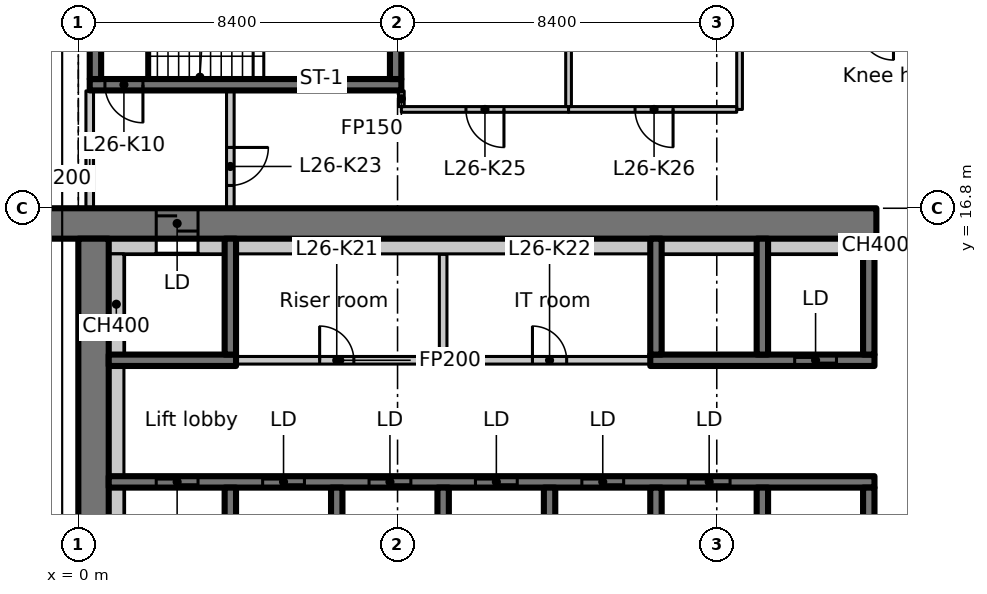
"""IFC4 building model, lengths in metres.
Left out: names, types, materials, properties, quantities, classifications, styles, units other than length and angle.
Written with IfcOpenShell. Run it as: python <this file> out.ifc"""

import sys

from ifc_helpers import new_model, si_unit, direction, frame, frame_2d, origin, place, context, subcontext, project, spatial, rectangle, extrude, element, fill, save


model = new_model("IFC4")
c1 = context("Model", 3, precision=1e-05, world=origin(), true_north=direction((0.0, 1.0)))
c2 = subcontext(c1, "Body", "Model", "MODEL_VIEW")
j1 = project(units=[si_unit("LENGTHUNIT", "METRE"), si_unit("PLANEANGLEUNIT", "RADIAN")], contexts=[c1])
p1 = place(None, origin())
s1 = spatial("IfcSite", under=j1, at=p1, CompositionType="ELEMENT")
p2 = place(p1, origin())
s2 = spatial("IfcBuilding", under=s1, at=p2, CompositionType="ELEMENT")
p3 = place(p2, frame((0.0, 0.0, 109.7)))
s3 = spatial("IfcBuildingStorey", under=s2, at=p3, CompositionType="ELEMENT", Elevation=109.7)
p4 = place(p3, frame((-1.1, 16.4, 0.0), z_axis=(0.0, 0.0, 1.0), x_axis=(1.0, 0.0, 0.0)))
e1 = element("IfcWall", 1, at=p4, inside=s3, PredefinedType="SHEAR", context=c2, shape_type="SweptSolid", body=[
    extrude(rectangle(XDim=22.1, YDim=0.8, at=frame_2d((11.05, 0.0))), origin(), (0.0, 0.0, 1.0), 3.35),
])
p5 = place(p4, frame((3.15, 0.0, 0.0)))
e2 = element("IfcOpeningElement", 2, at=p5, cuts=e1, PredefinedType="OPENING", context=c2, shape_type="SweptSolid", body=[
    extrude(rectangle(XDim=1.1, YDim=2.3, at=frame_2d((0.55, 1.15))), frame((0.0, 0.41, 0.0), z_axis=(0.0, -1.0, 0.0), x_axis=(1.0, 0.0, 0.0)), (0.0, 0.0, 1.0), 0.82),
])
p6 = place(p3, frame((0.4, 7.136, 0.0), z_axis=(0.0, 0.0, 1.0), x_axis=(0.0, 1.0, 0.0)))
e3 = element("IfcWall", 3, at=p6, inside=s3, PredefinedType="SHEAR", context=c2, shape_type="SweptSolid", body=[
    extrude(rectangle(XDim=8.864, YDim=0.8, at=frame_2d((4.432, 0.0))), origin(), (0.0, 0.0, 1.0), 3.35),
])
p7 = place(p3, frame((0.8, 15.8, 0.0), z_axis=(0.0, 0.0, 1.0), x_axis=(1.0, 0.0, 0.0)))
e4 = element("IfcWall", 4, at=p7, inside=s3, PredefinedType="PARTITIONING", context=c2, shape_type="SweptSolid", body=[
    extrude(rectangle(XDim=1.25, YDim=0.4, at=frame_2d((0.625, 0.0))), origin(), (0.0, 0.0, 1.0), 3.35),
])
p8 = place(p3, frame((0.8, 9.6, 0.0), z_axis=(0.0, 0.0, 1.0), x_axis=(1.0, 0.0, 0.0)))
e5 = element("IfcWall", 5, at=p8, inside=s3, PredefinedType="SHEAR", context=c2, shape_type="SweptSolid", body=[
    extrude(rectangle(XDim=20.15, YDim=0.3, at=frame_2d((10.075, 0.0))), origin(), (0.0, 0.0, 1.0), 3.35),
])
p9 = place(p8, frame((1.25, 0.0, 0.0)))
e6 = element("IfcOpeningElement", 6, at=p9, cuts=e5, PredefinedType="OPENING", context=c2, shape_type="SweptSolid", body=[
    extrude(rectangle(XDim=1.1, YDim=2.3, at=frame_2d((0.55, 1.15))), frame((0.0, 0.16, 0.0), z_axis=(0.0, -1.0, 0.0), x_axis=(1.0, 0.0, 0.0)), (0.0, 0.0, 1.0), 0.32),
])
p10 = place(p8, frame((4.05, 0.0, 0.0)))
e7 = element("IfcOpeningElement", 7, at=p10, cuts=e5, PredefinedType="OPENING", context=c2, shape_type="SweptSolid", body=[
    extrude(rectangle(XDim=1.1, YDim=2.3, at=frame_2d((0.55, 1.15))), frame((0.0, 0.16, 0.0), z_axis=(0.0, -1.0, 0.0), x_axis=(1.0, 0.0, 0.0)), (0.0, 0.0, 1.0), 0.32),
])
p11 = place(p8, frame((6.85, 0.0, 0.0)))
e8 = element("IfcOpeningElement", 8, at=p11, cuts=e5, PredefinedType="OPENING", context=c2, shape_type="SweptSolid", body=[
    extrude(rectangle(XDim=1.1, YDim=2.3, at=frame_2d((0.55, 1.15))), frame((0.0, 0.16, 0.0), z_axis=(0.0, -1.0, 0.0), x_axis=(1.0, 0.0, 0.0)), (0.0, 0.0, 1.0), 0.32),
])
p12 = place(p8, frame((9.65, 0.0, 0.0)))
e9 = element("IfcOpeningElement", 9, at=p12, cuts=e5, PredefinedType="OPENING", context=c2, shape_type="SweptSolid", body=[
    extrude(rectangle(XDim=1.1, YDim=2.3, at=frame_2d((0.55, 1.15))), frame((0.0, 0.16, 0.0), z_axis=(0.0, -1.0, 0.0), x_axis=(1.0, 0.0, 0.0)), (0.0, 0.0, 1.0), 0.32),
])
p13 = place(p8, frame((12.45, 0.0, 0.0)))
e10 = element("IfcOpeningElement", 10, at=p13, cuts=e5, PredefinedType="OPENING", context=c2, shape_type="SweptSolid", body=[
    extrude(rectangle(XDim=1.1, YDim=2.3, at=frame_2d((0.55, 1.15))), frame((0.0, 0.16, 0.0), z_axis=(0.0, -1.0, 0.0), x_axis=(1.0, 0.0, 0.0)), (0.0, 0.0, 1.0), 0.32),
])
p14 = place(p8, frame((15.25, 0.0, 0.0)))
e11 = element("IfcOpeningElement", 11, at=p14, cuts=e5, PredefinedType="OPENING", context=c2, shape_type="SweptSolid", body=[
    extrude(rectangle(XDim=1.1, YDim=2.3, at=frame_2d((0.55, 1.15))), frame((0.0, 0.16, 0.0), z_axis=(0.0, -1.0, 0.0), x_axis=(1.0, 0.0, 0.0)), (0.0, 0.0, 1.0), 0.32),
])
for number, where, z_axis, x_axis in (
    (12, (4.0, 7.15, 0.0), (0.0, 0.0, 1.0), (0.0, 1.0, 0.0)),
    (13, (6.8, 7.15, 0.0), (0.0, 0.0, 1.0), (0.0, 1.0, 0.0)),
    (14, (9.6, 7.15, 0.0), (0.0, 0.0, 1.0), (0.0, 1.0, 0.0)),
    (15, (12.4, 7.15, 0.0), (0.0, 0.0, 1.0), (0.0, 1.0, 0.0)),
    (16, (15.2, 7.15, 0.0), (0.0, 0.0, 1.0), (0.0, 1.0, 0.0)),
    (17, (18.0, 7.15, 0.0), (0.0, 0.0, 1.0), (0.0, 1.0, 0.0)),
    (18, (20.8, 7.15, 0.0), (0.0, 0.0, 1.0), (0.0, 1.0, 0.0)),
):
    element("IfcWall", number, at=place(p3, frame(where, z_axis=z_axis, x_axis=x_axis)), inside=s3, PredefinedType="SHEAR", context=c2, shape_type="SweptSolid", body=[
        extrude(rectangle(XDim=2.3, YDim=0.3, at=frame_2d((1.15, 0.0))), origin(), (0.0, 0.0, 1.0), 3.35),
    ])
p15 = place(p3, frame((0.8, 12.8, 0.0), z_axis=(0.0, 0.0, 1.0), x_axis=(1.0, 0.0, 0.0)))
e19 = element("IfcWall", 19, at=p15, inside=s3, PredefinedType="SHEAR", context=c2, shape_type="SweptSolid", body=[
    extrude(rectangle(XDim=3.35, YDim=0.3, at=frame_2d((1.675, 0.0))), origin(), (0.0, 0.0, 1.0), 3.35),
])
p16 = place(p3, frame((4.0, 12.95, 0.0), z_axis=(0.0, 0.0, 1.0), x_axis=(0.0, 1.0, 0.0)))
e20 = element("IfcWall", 20, at=p16, inside=s3, PredefinedType="SHEAR", context=c2, shape_type="SweptSolid", body=[
    extrude(rectangle(XDim=3.05, YDim=0.3, at=frame_2d((1.525, 0.0))), origin(), (0.0, 0.0, 1.0), 3.35),
])
p17 = place(p3, frame((15.05, 12.8, 0.0), z_axis=(0.0, 0.0, 1.0), x_axis=(1.0, 0.0, 0.0)))
e21 = element("IfcWall", 21, at=p17, inside=s3, PredefinedType="SHEAR", context=c2, shape_type="SweptSolid", body=[
    extrude(rectangle(XDim=5.9, YDim=0.3, at=frame_2d((2.95, 0.0))), origin(), (0.0, 0.0, 1.0), 3.35),
])
p18 = place(p17, frame((3.8, 0.0, 0.0)))
e22 = element("IfcOpeningElement", 22, at=p18, cuts=e21, PredefinedType="OPENING", context=c2, shape_type="SweptSolid", body=[
    extrude(rectangle(XDim=1.1, YDim=2.3, at=frame_2d((0.55, 1.15))), frame((0.0, 0.16, 0.0), z_axis=(0.0, -1.0, 0.0), x_axis=(1.0, 0.0, 0.0)), (0.0, 0.0, 1.0), 0.32),
])
for number, where, z_axis, x_axis in (
    (23, (15.2, 12.95, 0.0), (0.0, 0.0, 1.0), (0.0, 1.0, 0.0)),
    (24, (18.0, 12.95, 0.0), (0.0, 0.0, 1.0), (0.0, 1.0, 0.0)),
    (25, (20.8, 12.95, 0.0), (0.0, 0.0, 1.0), (0.0, 1.0, 0.0)),
):
    element("IfcWall", number, at=place(p3, frame(where, z_axis=z_axis, x_axis=x_axis)), inside=s3, PredefinedType="SHEAR", context=c2, shape_type="SweptSolid", body=[
        extrude(rectangle(XDim=3.05, YDim=0.3, at=frame_2d((1.525, 0.0))), origin(), (0.0, 0.0, 1.0), 3.35),
    ])
p19 = place(p3, frame((8.5, 20.05, 0.0), z_axis=(0.0, 0.0, 1.0), x_axis=(-1.0, 0.0, 0.0)))
e26 = element("IfcWall", 26, at=p19, inside=s3, PredefinedType="SHEAR", context=c2, shape_type="SweptSolid", body=[
    extrude(rectangle(XDim=8.2, YDim=0.3, at=frame_2d((4.1, 0.0))), origin(), (0.0, 0.0, 1.0), 3.35),
])
p20 = place(p19, frame((6.8, 0.0, 0.0)))
e27 = element("IfcOpeningElement", 27, at=p20, cuts=e26, PredefinedType="OPENING", context=c2, shape_type="SweptSolid", body=[
    extrude(rectangle(XDim=1.0, YDim=2.1, at=frame_2d((0.5, 1.05))), frame((0.0, 0.16, 0.0), z_axis=(0.0, -1.0, 0.0), x_axis=(1.0, 0.0, 0.0)), (0.0, 0.0, 1.0), 0.32),
])
for number, where, z_axis, x_axis in (
    (28, (0.45, 20.2, 0.0), (0.0, 0.0, 1.0), (0.0, 1.0, 0.0)),
    (29, (8.35, 20.2, 0.0), (0.0, 0.0, 1.0), (0.0, 1.0, 0.0)),
):
    element("IfcWall", number, at=place(p3, frame(where, z_axis=z_axis, x_axis=x_axis)), inside=s3, PredefinedType="SHEAR", context=c2, shape_type="SweptSolid", body=[
        extrude(rectangle(XDim=2.55, YDim=0.3, at=frame_2d((1.275, 0.0))), origin(), (0.0, 0.0, 1.0), 3.35),
    ])
p21 = place(p3, frame((0.3, 16.812, 0.0), z_axis=(0.0, 0.0, 1.0), x_axis=(0.0, 1.0, 0.0)))
e30 = element("IfcWall", 30, at=p21, inside=s3, PredefinedType="PARTITIONING", context=c2, shape_type="SweptSolid", body=[
    extrude(rectangle(XDim=3.076, YDim=0.2, at=frame_2d((1.538, 0.0))), origin(), (0.0, 0.0, 1.0), 2.98),
])
p22 = place(p3, frame((4.0, 19.888, 0.0), z_axis=(0.0, 0.0, 1.0), x_axis=(0.0, -1.0, 0.0)))
e31 = element("IfcWall", 31, at=p22, inside=s3, PredefinedType="PARTITIONING", context=c2, shape_type="SweptSolid", body=[
    extrude(rectangle(XDim=3.076, YDim=0.2, at=frame_2d((1.538, 0.0))), origin(), (0.0, 0.0, 1.0), 3.35),
])
p23 = place(p22, frame((1.488, 0.0, 0.0)))
e32 = element("IfcOpeningElement", 32, at=p23, cuts=e31, PredefinedType="OPENING", context=c2, shape_type="SweptSolid", body=[
    extrude(rectangle(XDim=1.0, YDim=2.1, at=frame_2d((0.5, 1.05))), frame((0.0, 0.11, 0.0), z_axis=(0.0, -1.0, 0.0), x_axis=(1.0, 0.0, 0.0)), (0.0, 0.0, 1.0), 0.22),
])
p24 = place(p3, frame((4.162, 12.8, 0.0), z_axis=(0.0, 0.0, 1.0), x_axis=(1.0, 0.0, 0.0)))
e33 = element("IfcWall", 33, at=p24, inside=s3, PredefinedType="PARTITIONING", context=c2, shape_type="SweptSolid", body=[
    extrude(rectangle(XDim=5.438, YDim=0.2, at=frame_2d((2.719, 0.0))), origin(), (0.0, 0.0, 1.0), 3.35),
])
p25 = place(p24, frame((2.188, 0.0, 0.0)))
e34 = element("IfcOpeningElement", 34, at=p25, cuts=e33, PredefinedType="OPENING", context=c2, shape_type="SweptSolid", body=[
    extrude(rectangle(XDim=0.9, YDim=2.1, at=frame_2d((0.45, 1.05))), frame((0.0, 0.11, 0.0), z_axis=(0.0, -1.0, 0.0), x_axis=(1.0, 0.0, 0.0)), (0.0, 0.0, 1.0), 0.22),
])
p26 = place(p3, frame((9.6, 12.8, 0.0), z_axis=(0.0, 0.0, 1.0), x_axis=(1.0, 0.0, 0.0)))
e35 = element("IfcWall", 35, at=p26, inside=s3, PredefinedType="PARTITIONING", context=c2, shape_type="SweptSolid", body=[
    extrude(rectangle(XDim=5.438, YDim=0.2, at=frame_2d((2.719, 0.0))), origin(), (0.0, 0.0, 1.0), 3.35),
])
p27 = place(p26, frame((2.35, 0.0, 0.0)))
e36 = element("IfcOpeningElement", 36, at=p27, cuts=e35, PredefinedType="OPENING", context=c2, shape_type="SweptSolid", body=[
    extrude(rectangle(XDim=0.9, YDim=2.1, at=frame_2d((0.45, 1.05))), frame((0.0, 0.11, 0.0), z_axis=(0.0, -1.0, 0.0), x_axis=(1.0, 0.0, 0.0)), (0.0, 0.0, 1.0), 0.22),
])
p28 = place(p3, frame((9.6, 15.588, 0.0), z_axis=(0.0, 0.0, 1.0), x_axis=(0.0, -1.0, 0.0)))
e37 = element("IfcWall", 37, at=p28, inside=s3, PredefinedType="PARTITIONING", context=c2, shape_type="SweptSolid", body=[
    extrude(rectangle(XDim=2.688, YDim=0.2, at=frame_2d((1.344, 0.0))), origin(), (0.0, 0.0, 1.0), 3.35),
])
p29 = place(p3, frame((12.9, 19.4, 0.0), z_axis=(0.0, 0.0, 1.0), x_axis=(-1.0, 0.0, 0.0)))
e38 = element("IfcWall", 38, at=p29, inside=s3, PredefinedType="PARTITIONING", context=c2, shape_type="SweptSolid", body=[
    extrude(rectangle(XDim=4.4, YDim=0.15, at=frame_2d((2.2, 0.0))), origin(), (0.0, 0.0, 1.0), 3.35),
])
p30 = place(p29, frame((1.7, 0.0, 0.0)))
e39 = element("IfcOpeningElement", 39, at=p30, cuts=e38, PredefinedType="OPENING", context=c2, shape_type="SweptSolid", body=[
    extrude(rectangle(XDim=1.0, YDim=2.1, at=frame_2d((0.5, 1.05))), frame((0.0, 0.085, 0.0), z_axis=(0.0, -1.0, 0.0), x_axis=(1.0, 0.0, 0.0)), (0.0, 0.0, 1.0), 0.17),
])
p31 = place(p3, frame((8.5, 19.475, 0.0), z_axis=(0.0, 0.0, 1.0), x_axis=(0.0, 1.0, 0.0)))
e40 = element("IfcWall", 40, at=p31, inside=s3, PredefinedType="PARTITIONING", context=c2, shape_type="SweptSolid", body=[
    extrude(rectangle(XDim=0.413, YDim=0.15, at=frame_2d((0.207, 0.0))), origin(), (0.0, 0.0, 1.0), 3.35),
])
p32 = place(p3, frame((17.4, 23.825, 0.0), z_axis=(0.0, 0.0, 1.0), x_axis=(0.0, -1.0, 0.0)))
e41 = element("IfcWall", 41, at=p32, inside=s3, PredefinedType="PARTITIONING", context=c2, shape_type="SweptSolid", body=[
    extrude(rectangle(XDim=4.425, YDim=0.15, at=frame_2d((2.212, 0.0))), origin(), (0.0, 0.0, 1.0), 3.35),
])
p33 = place(p3, frame((17.325, 19.4, 0.0), z_axis=(0.0, 0.0, 1.0), x_axis=(-1.0, 0.0, 0.0)))
e42 = element("IfcWall", 42, at=p33, inside=s3, PredefinedType="PARTITIONING", context=c2, shape_type="SweptSolid", body=[
    extrude(rectangle(XDim=4.425, YDim=0.15, at=frame_2d((2.212, 0.0))), origin(), (0.0, 0.0, 1.0), 3.35),
])
p34 = place(p33, frame((1.675, 0.0, 0.0)))
e43 = element("IfcOpeningElement", 43, at=p34, cuts=e42, PredefinedType="OPENING", context=c2, shape_type="SweptSolid", body=[
    extrude(rectangle(XDim=1.0, YDim=2.1, at=frame_2d((0.5, 1.05))), frame((0.0, 0.085, 0.0), z_axis=(0.0, -1.0, 0.0), x_axis=(1.0, 0.0, 0.0)), (0.0, 0.0, 1.0), 0.17),
])
p35 = place(p3, frame((12.9, 23.825, 0.0), z_axis=(0.0, 0.0, 1.0), x_axis=(0.0, -1.0, 0.0)))
e44 = element("IfcWall", 44, at=p35, inside=s3, PredefinedType="PARTITIONING", context=c2, shape_type="SweptSolid", body=[
    extrude(rectangle(XDim=4.35, YDim=0.15, at=frame_2d((2.175, 0.0))), origin(), (0.0, 0.0, 1.0), 3.35),
])
p36 = place(p3, frame((1.0, 7.15, 0.0), z_axis=(0.0, 0.0, 1.0), x_axis=(0.0, 1.0, 0.0)))
e45 = element("IfcWall", 45, at=p36, inside=s3, PredefinedType="PARTITIONING", context=c2, shape_type="SweptSolid", body=[
    extrude(rectangle(XDim=2.3, YDim=0.4, at=frame_2d((1.15, 0.0))), origin(), (0.0, 0.0, 1.0), 3.35),
])
p37 = place(p3, frame((1.0, 9.75, 0.0), z_axis=(0.0, 0.0, 1.0), x_axis=(0.0, 1.0, 0.0)))
e46 = element("IfcWall", 46, at=p37, inside=s3, PredefinedType="PARTITIONING", context=c2, shape_type="SweptSolid", body=[
    extrude(rectangle(XDim=2.9, YDim=0.4, at=frame_2d((1.45, 0.0))), origin(), (0.0, 0.0, 1.0), 3.35),
])
p38 = place(p3, frame((1.0, 12.95, 0.0), z_axis=(0.0, 0.0, 1.0), x_axis=(0.0, 1.0, 0.0)))
e47 = element("IfcWall", 47, at=p38, inside=s3, PredefinedType="PARTITIONING", context=c2, shape_type="SweptSolid", body=[
    extrude(rectangle(XDim=2.65, YDim=0.4, at=frame_2d((1.325, 0.0))), origin(), (0.0, 0.0, 1.0), 3.35),
])
p39 = place(p3, frame((3.15, 15.8, 0.0), z_axis=(0.0, 0.0, 1.0), x_axis=(1.0, 0.0, 0.0)))
e48 = element("IfcWall", 48, at=p39, inside=s3, PredefinedType="PARTITIONING", context=c2, shape_type="SweptSolid", body=[
    extrude(rectangle(XDim=0.7, YDim=0.4, at=frame_2d((0.35, 0.0))), origin(), (0.0, 0.0, 1.0), 3.35),
])
p40 = place(p3, frame((4.15, 15.8, 0.0), z_axis=(0.0, 0.0, 1.0), x_axis=(1.0, 0.0, 0.0)))
e49 = element("IfcWall", 49, at=p40, inside=s3, PredefinedType="PARTITIONING", context=c2, shape_type="SweptSolid", body=[
    extrude(rectangle(XDim=10.9, YDim=0.4, at=frame_2d((5.45, 0.0))), origin(), (0.0, 0.0, 1.0), 3.35),
])
for number, where, z_axis, x_axis in (
    (50, (15.35, 15.8, 0.0), (0.0, 0.0, 1.0), (1.0, 0.0, 0.0)),
    (51, (18.15, 15.8, 0.0), (0.0, 0.0, 1.0), (1.0, 0.0, 0.0)),
):
    element("IfcWall", number, at=place(p3, frame(where, z_axis=z_axis, x_axis=x_axis)), inside=s3, PredefinedType="PARTITIONING", context=c2, shape_type="SweptSolid", body=[
        extrude(rectangle(XDim=2.5, YDim=0.4, at=frame_2d((1.25, 0.0))), origin(), (0.0, 0.0, 1.0), 3.35),
    ])
p41 = place(p3, frame((20.95, 15.8, 0.0), z_axis=(0.0, 0.0, 1.0), x_axis=(1.0, 0.0, 0.0)))
e52 = element("IfcWall", 52, at=p41, inside=s3, PredefinedType="PARTITIONING", context=c2, shape_type="SweptSolid", body=[
    extrude(rectangle(XDim=0.05, YDim=0.4, at=frame_2d((0.025, 0.0))), origin(), (0.0, 0.0, 1.0), 3.35),
])
p42 = place(p9, origin())
e53 = element("IfcDoor", 53, at=p42, inside=s3, OperationType="SLIDING_TO_LEFT", PredefinedType="DOOR", context=c2, shape_type="SweptSolid", body=[
    extrude(rectangle(XDim=1.1, YDim=2.3, at=frame_2d((0.55, 1.15))), frame((0.0, 0.025, 0.0), z_axis=(0.0, -1.0, 0.0), x_axis=(1.0, 0.0, 0.0)), (0.0, 0.0, 1.0), 0.05),
])
fill(e6, e53)
p43 = place(p10, origin())
e54 = element("IfcDoor", 54, at=p43, inside=s3, OperationType="SLIDING_TO_LEFT", PredefinedType="DOOR", context=c2, shape_type="SweptSolid", body=[
    extrude(rectangle(XDim=1.1, YDim=2.3, at=frame_2d((0.55, 1.15))), frame((0.0, 0.025, 0.0), z_axis=(0.0, -1.0, 0.0), x_axis=(1.0, 0.0, 0.0)), (0.0, 0.0, 1.0), 0.05),
])
fill(e7, e54)
p44 = place(p11, origin())
e55 = element("IfcDoor", 55, at=p44, inside=s3, OperationType="SLIDING_TO_LEFT", PredefinedType="DOOR", context=c2, shape_type="SweptSolid", body=[
    extrude(rectangle(XDim=1.1, YDim=2.3, at=frame_2d((0.55, 1.15))), frame((0.0, 0.025, 0.0), z_axis=(0.0, -1.0, 0.0), x_axis=(1.0, 0.0, 0.0)), (0.0, 0.0, 1.0), 0.05),
])
fill(e8, e55)
p45 = place(p12, origin())
e56 = element("IfcDoor", 56, at=p45, inside=s3, OperationType="SLIDING_TO_LEFT", PredefinedType="DOOR", context=c2, shape_type="SweptSolid", body=[
    extrude(rectangle(XDim=1.1, YDim=2.3, at=frame_2d((0.55, 1.15))), frame((0.0, 0.025, 0.0), z_axis=(0.0, -1.0, 0.0), x_axis=(1.0, 0.0, 0.0)), (0.0, 0.0, 1.0), 0.05),
])
fill(e9, e56)
p46 = place(p13, origin())
e57 = element("IfcDoor", 57, at=p46, inside=s3, OperationType="SLIDING_TO_LEFT", PredefinedType="DOOR", context=c2, shape_type="SweptSolid", body=[
    extrude(rectangle(XDim=1.1, YDim=2.3, at=frame_2d((0.55, 1.15))), frame((0.0, 0.025, 0.0), z_axis=(0.0, -1.0, 0.0), x_axis=(1.0, 0.0, 0.0)), (0.0, 0.0, 1.0), 0.05),
])
fill(e10, e57)
p47 = place(p14, origin())
e58 = element("IfcDoor", 58, at=p47, inside=s3, OperationType="SLIDING_TO_LEFT", PredefinedType="DOOR", context=c2, shape_type="SweptSolid", body=[
    extrude(rectangle(XDim=1.1, YDim=2.3, at=frame_2d((0.55, 1.15))), frame((0.0, 0.025, 0.0), z_axis=(0.0, -1.0, 0.0), x_axis=(1.0, 0.0, 0.0)), (0.0, 0.0, 1.0), 0.05),
])
fill(e11, e58)
p48 = place(p5, origin())
e59 = element("IfcDoor", 59, at=p48, inside=s3, OperationType="SLIDING_TO_LEFT", PredefinedType="DOOR", context=c2, shape_type="SweptSolid", body=[
    extrude(rectangle(XDim=1.1, YDim=2.3, at=frame_2d((0.55, 1.15))), frame((0.0, 0.025, 0.0), z_axis=(0.0, -1.0, 0.0), x_axis=(1.0, 0.0, 0.0)), (0.0, 0.0, 1.0), 0.05),
])
fill(e2, e59)
p49 = place(p18, origin())
e60 = element("IfcDoor", 60, at=p49, inside=s3, OperationType="SLIDING_TO_LEFT", PredefinedType="DOOR", context=c2, shape_type="SweptSolid", body=[
    extrude(rectangle(XDim=1.1, YDim=2.3, at=frame_2d((0.55, 1.15))), frame((0.0, 0.025, 0.0), z_axis=(0.0, -1.0, 0.0), x_axis=(1.0, 0.0, 0.0)), (0.0, 0.0, 1.0), 0.05),
])
fill(e22, e60)
p50 = place(p20, origin())
e61 = element("IfcDoor", 61, at=p50, inside=s3, OperationType="SINGLE_SWING_RIGHT", PredefinedType="DOOR", context=c2, shape_type="SweptSolid", body=[
    extrude(rectangle(XDim=1.0, YDim=2.1, at=frame_2d((0.5, 1.05))), frame((0.0, 0.025, 0.0), z_axis=(0.0, -1.0, 0.0), x_axis=(1.0, 0.0, 0.0)), (0.0, 0.0, 1.0), 0.05),
])
fill(e27, e61)
p51 = place(p25, origin())
e62 = element("IfcDoor", 62, at=p51, inside=s3, OperationType="SINGLE_SWING_LEFT", PredefinedType="DOOR", context=c2, shape_type="SweptSolid", body=[
    extrude(rectangle(XDim=0.9, YDim=2.1, at=frame_2d((0.45, 1.05))), frame((0.0, 0.025, 0.0), z_axis=(0.0, -1.0, 0.0), x_axis=(1.0, 0.0, 0.0)), (0.0, 0.0, 1.0), 0.05),
])
fill(e34, e62)
p52 = place(p27, origin())
e63 = element("IfcDoor", 63, at=p52, inside=s3, OperationType="SINGLE_SWING_RIGHT", PredefinedType="DOOR", context=c2, shape_type="SweptSolid", body=[
    extrude(rectangle(XDim=0.9, YDim=2.1, at=frame_2d((0.45, 1.05))), frame((0.0, 0.025, 0.0), z_axis=(0.0, -1.0, 0.0), x_axis=(1.0, 0.0, 0.0)), (0.0, 0.0, 1.0), 0.05),
])
fill(e36, e63)
p53 = place(p23, origin())
e64 = element("IfcDoor", 64, at=p53, inside=s3, OperationType="SINGLE_SWING_LEFT", PredefinedType="DOOR", context=c2, shape_type="SweptSolid", body=[
    extrude(rectangle(XDim=1.0, YDim=2.1, at=frame_2d((0.5, 1.05))), frame((0.0, 0.025, 0.0), z_axis=(0.0, -1.0, 0.0), x_axis=(1.0, 0.0, 0.0)), (0.0, 0.0, 1.0), 0.05),
])
fill(e32, e64)
p54 = place(p30, origin())
e65 = element("IfcDoor", 65, at=p54, inside=s3, OperationType="SINGLE_SWING_LEFT", PredefinedType="DOOR", context=c2, shape_type="SweptSolid", body=[
    extrude(rectangle(XDim=1.0, YDim=2.1, at=frame_2d((0.5, 1.05))), frame((0.0, 0.025, 0.0), z_axis=(0.0, -1.0, 0.0), x_axis=(1.0, 0.0, 0.0)), (0.0, 0.0, 1.0), 0.05),
])
fill(e39, e65)
p55 = place(p34, origin())
e66 = element("IfcDoor", 66, at=p55, inside=s3, OperationType="SINGLE_SWING_RIGHT", PredefinedType="DOOR", context=c2, shape_type="SweptSolid", body=[
    extrude(rectangle(XDim=1.0, YDim=2.1, at=frame_2d((0.5, 1.05))), frame((0.0, 0.025, 0.0), z_axis=(0.0, -1.0, 0.0), x_axis=(1.0, 0.0, 0.0)), (0.0, 0.0, 1.0), 0.05),
])
fill(e43, e66)
save(model, sys.argv[1])
